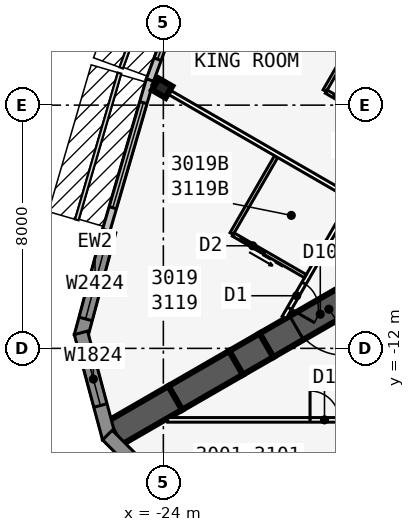
"""IFC4 building model, lengths in metres.
Left out: names, types, materials, properties, quantities, classifications, styles, units other than length and angle.
Written with IfcOpenShell. Run it as: python <this file> out.ifc"""

import sys

from ifc_helpers import new_model, si_unit, direction, frame, frame_2d, origin, origin_2d, place, context, subcontext, project, spatial, polyline, rectangle, i_section, outline, extrude, element, fill, save


model = new_model("IFC4")
c1 = context("Model", 3, precision=1e-05, world=origin(), true_north=direction((0.0, 1.0)))
c2 = subcontext(c1, "Body", "Model", "MODEL_VIEW")
j1 = project(units=[si_unit("LENGTHUNIT", "METRE"), si_unit("PLANEANGLEUNIT", "RADIAN")], contexts=[c1])
p1 = place(None, origin())
s1 = spatial("IfcSite", under=j1, at=p1, CompositionType="ELEMENT")
p2 = place(p1, origin())
s2 = spatial("IfcBuilding", under=s1, at=p2, CompositionType="ELEMENT")
p3 = place(p2, frame((0.0, 0.0, 118.1)))
s3 = spatial("IfcBuildingStorey", under=s2, at=p3, CompositionType="ELEMENT", Elevation=118.1)
p4 = place(p3, frame((-16.5, -9.526, 0.0), z_axis=(0.0, 0.0, 1.0), x_axis=(-0.866031398331, -0.499989616998, 0.0)))
e1 = element("IfcWall", 1, at=p4, inside=s3, PredefinedType="SHEAR", context=c2, shape_type="SweptSolid", body=[
    extrude(rectangle(XDim=4.746, YDim=0.9, at=frame_2d((2.373, 0.0))), origin(), (0.0, 0.0, 1.0), 3.4),
])
p5 = place(p4, frame((1.8, 0.0, 0.0)))
e2 = element("IfcOpeningElement", 2, at=p5, cuts=e1, PredefinedType="OPENING", context=c2, shape_type="SweptSolid", body=[
    extrude(rectangle(XDim=1.8, YDim=2.13, at=frame_2d((0.9, 1.065))), frame((0.0, 0.46, 0.0), z_axis=(0.0, -1.0, 0.0), x_axis=(1.0, 0.0, 0.0)), (0.0, 0.0, 1.0), 0.92),
])
p6 = place(p3, frame((-20.61, -11.899, 0.0), z_axis=(0.0, 0.0, 1.0), x_axis=(-0.866009537788, -0.500027479704, 0.0)))
e3 = element("IfcWall", 3, at=p6, inside=s3, PredefinedType="SHEAR", context=c2, shape_type="SweptSolid", body=[
    extrude(rectangle(XDim=1.155, YDim=0.9, at=frame_2d((0.577, 0.0))), origin(), (0.0, 0.0, 1.0), 3.4),
])
for number, where, z_axis, x_axis in (
    (4, (-21.61, -12.477, 0.0), (0.0, 0.0, 1.0), (-0.866, -0.5, 0.0)),
    (5, (-23.61, -13.631, 0.0), (0.0, 0.0, 1.0), (-0.866, -0.5, 0.0)),
):
    element("IfcWall", number, at=place(p3, frame(where, z_axis=z_axis, x_axis=x_axis)), inside=s3, PredefinedType="SHEAR", context=c2, shape_type="SweptSolid", body=[
        extrude(rectangle(XDim=2.309, YDim=0.9, at=frame_2d((1.155, 0.0))), origin(), (0.0, 0.0, 1.0), 3.4),
    ])
p7 = place(p3, frame((-24.041, -3.44, 0.0), z_axis=(0.0, 0.0, 1.0), x_axis=(-0.5, -0.866025403784, 0.0)))
e6 = element("IfcColumn", 6, at=p7, inside=s3, PredefinedType="COLUMN", context=c2, shape_type="SweptSolid", body=[
    extrude(i_section(OverallWidth=0.437, OverallDepth=0.513, WebThickness=0.061, FlangeThickness=0.097, at=origin_2d()), origin(), (0.0, 0.0, 1.0), 3.4),
])
p8 = place(p3, frame((-22.701, 1.584, 0.0), z_axis=(0.0, 0.0, 1.0), x_axis=(-0.343225593282, -0.939252996863, 0.0)))
e7 = element("IfcWall", 7, at=p8, inside=s3, PredefinedType="STANDARD", context=c2, shape_type="SweptSolid", body=[
    extrude(rectangle(XDim=5.076, YDim=0.25, at=frame_2d((2.538, 0.0))), origin(), (0.0, 0.0, 1.0), 3.235),
])
p9 = place(p8, frame((0.738, 0.0, 0.45)))
e8 = element("IfcOpeningElement", 8, at=p9, cuts=e7, PredefinedType="OPENING", context=c2, shape_type="SweptSolid", body=[
    extrude(rectangle(XDim=3.6, YDim=2.4, at=frame_2d((1.8, 1.2))), frame((0.0, 0.135, 0.0), z_axis=(0.0, -1.0, 0.0), x_axis=(1.0, 0.0, 0.0)), (0.0, 0.0, 1.0), 0.27),
])
p10 = place(p3, frame((-24.441, -3.175, 0.0), z_axis=(0.0, 0.0, 1.0), x_axis=(-0.279528287117, -0.960137457191, 0.0)))
e9 = element("IfcWall", 9, at=p10, inside=s3, PredefinedType="STANDARD", context=c2, shape_type="SweptSolid", body=[
    extrude(rectangle(XDim=5.148, YDim=0.25, at=frame_2d((2.574, 0.0))), origin(), (0.0, 0.0, 1.0), 3.235),
])
p11 = place(p10, frame((0.774, 0.0, 0.45)))
e10 = element("IfcOpeningElement", 10, at=p11, cuts=e9, PredefinedType="OPENING", context=c2, shape_type="SweptSolid", body=[
    extrude(rectangle(XDim=3.6, YDim=2.4, at=frame_2d((1.8, 1.2))), frame((0.0, 0.135, 0.0), z_axis=(0.0, -1.0, 0.0), x_axis=(1.0, 0.0, 0.0)), (0.0, 0.0, 1.0), 0.27),
])
p12 = place(p3, frame((-25.783, -8.141, 0.0), z_axis=(0.0, 0.0, 1.0), x_axis=(-0.258823421857, -0.965924653531, 0.0)))
e11 = element("IfcWall", 11, at=p12, inside=s3, PredefinedType="SOLIDWALL", context=c2, shape_type="SweptSolid", body=[
    extrude(rectangle(XDim=3.586, YDim=0.45, at=frame_2d((1.793, 0.0))), origin(), (0.0, 0.0, 1.0), 3.235),
])
p13 = place(p12, frame((0.593, 0.0, 0.45)))
e12 = element("IfcOpeningElement", 12, at=p13, cuts=e11, PredefinedType="OPENING", context=c2, shape_type="SweptSolid", body=[
    extrude(rectangle(XDim=2.4, YDim=2.4, at=frame_2d((1.2, 1.2))), frame((0.0, 0.235, 0.0), z_axis=(0.0, -1.0, 0.0), x_axis=(1.0, 0.0, 0.0)), (0.0, 0.0, 1.0), 0.47),
])
p14 = place(p3, frame((-26.711, -11.489, 0.0), z_axis=(0.0, 0.0, 1.0), x_axis=(0.258823421857, -0.965924653531, 0.0)))
e13 = element("IfcWall", 13, at=p14, inside=s3, PredefinedType="SOLIDWALL", context=c2, shape_type="SweptSolid", body=[
    extrude(outline(polyline([(3.586, 0.225), (3.527, 0.225), (3.035, 0.093), (3.0, 0.225), (0.0, 0.225), (0.0, -0.225), (3.586, -0.225), (3.586, 0.225)])), origin(), (0.0, 0.0, 1.0), 3.235),
])
p15 = place(p14, frame((0.675, 0.0, 0.45)))
e14 = element("IfcOpeningElement", 14, at=p15, cuts=e13, PredefinedType="OPENING", context=c2, shape_type="SweptSolid", body=[
    extrude(rectangle(XDim=1.8, YDim=2.4, at=frame_2d((0.9, 1.2))), frame((0.0, 0.235, 0.0), z_axis=(0.0, -1.0, 0.0), x_axis=(1.0, 0.0, 0.0)), (0.0, 0.0, 1.0), 0.47),
])
p16 = place(p3, frame((-25.841, -14.852, 0.0), z_axis=(0.0, 0.0, 1.0), x_axis=(0.707106781187, -0.707106781187, 0.0)))
e15 = element("IfcWall", 15, at=p16, inside=s3, PredefinedType="SOLIDWALL", context=c2, shape_type="SweptSolid", body=[
    extrude(outline(polyline([(3.586, 0.225), (0.586, 0.225), (0.551, 0.093), (0.059, 0.225), (0.0, 0.225), (0.0, -0.225), (3.586, -0.225), (3.586, 0.225)])), origin(), (0.0, 0.0, 1.0), 3.235),
])
p17 = place(p16, frame((1.111, 0.0, 0.45)))
e16 = element("IfcOpeningElement", 16, at=p17, cuts=e15, PredefinedType="OPENING", context=c2, shape_type="SweptSolid", body=[
    extrude(rectangle(XDim=1.8, YDim=2.4, at=frame_2d((0.9, 1.2))), frame((0.0, 0.235, 0.0), z_axis=(0.0, -1.0, 0.0), x_axis=(1.0, 0.0, 0.0)), (0.0, 0.0, 1.0), 0.47),
])
p18 = place(p3, frame((-23.857, -14.351, 0.0), z_axis=(0.0, 0.0, 1.0), x_axis=(1.0, 0.0, 0.0)))
e17 = element("IfcWall", 17, at=p18, inside=s3, PredefinedType="PARTITIONING", context=c2, shape_type="SweptSolid", body=[
    extrude(rectangle(XDim=47.714, YDim=0.15, at=frame_2d((23.857, 0.0))), origin(), (0.0, 0.0, 1.0), 3.235),
])
p19 = place(p18, frame((4.682, 0.0, 0.0)))
e18 = element("IfcOpeningElement", 18, at=p19, cuts=e17, PredefinedType="OPENING", context=c2, shape_type="SweptSolid", body=[
    extrude(rectangle(XDim=0.95, YDim=2.13, at=frame_2d((0.475, 1.065))), frame((0.0, 0.085, 0.0), z_axis=(0.0, -1.0, 0.0), x_axis=(1.0, 0.0, 0.0)), (0.0, 0.0, 1.0), 0.17),
])
p20 = place(p18, frame((11.482, 0.0, 0.0)))
e19 = element("IfcOpeningElement", 19, at=p20, cuts=e17, PredefinedType="OPENING", context=c2, shape_type="SweptSolid", body=[
    extrude(rectangle(XDim=0.95, YDim=2.13, at=frame_2d((0.475, 1.065))), frame((0.0, 0.085, 0.0), z_axis=(0.0, -1.0, 0.0), x_axis=(1.0, 0.0, 0.0)), (0.0, 0.0, 1.0), 0.17),
])
p21 = place(p18, frame((16.482, 0.0, 0.0)))
e20 = element("IfcOpeningElement", 20, at=p21, cuts=e17, PredefinedType="OPENING", context=c2, shape_type="SweptSolid", body=[
    extrude(rectangle(XDim=0.95, YDim=2.13, at=frame_2d((0.475, 1.065))), frame((0.0, 0.085, 0.0), z_axis=(0.0, -1.0, 0.0), x_axis=(1.0, 0.0, 0.0)), (0.0, 0.0, 1.0), 0.17),
])
p22 = place(p18, frame((21.482, 0.0, 0.0)))
e21 = element("IfcOpeningElement", 21, at=p22, cuts=e17, PredefinedType="OPENING", context=c2, shape_type="SweptSolid", body=[
    extrude(rectangle(XDim=0.95, YDim=2.13, at=frame_2d((0.475, 1.065))), frame((0.0, 0.085, 0.0), z_axis=(0.0, -1.0, 0.0), x_axis=(1.0, 0.0, 0.0)), (0.0, 0.0, 1.0), 0.17),
])
p23 = place(p18, frame((25.857, 0.0, 0.0)))
e22 = element("IfcOpeningElement", 22, at=p23, cuts=e17, PredefinedType="OPENING", context=c2, shape_type="SweptSolid", body=[
    extrude(rectangle(XDim=1.0, YDim=2.13, at=frame_2d((0.5, 1.065))), frame((0.0, 0.085, 0.0), z_axis=(0.0, -1.0, 0.0), x_axis=(1.0, 0.0, 0.0)), (0.0, 0.0, 1.0), 0.17),
])
p24 = place(p18, frame((32.082, 0.0, 0.0)))
e23 = element("IfcOpeningElement", 23, at=p24, cuts=e17, PredefinedType="OPENING", context=c2, shape_type="SweptSolid", body=[
    extrude(rectangle(XDim=0.95, YDim=2.13, at=frame_2d((0.475, 1.065))), frame((0.0, 0.085, 0.0), z_axis=(0.0, -1.0, 0.0), x_axis=(1.0, 0.0, 0.0)), (0.0, 0.0, 1.0), 0.17),
])
p25 = place(p18, frame((42.082, 0.0, 0.0)))
e24 = element("IfcOpeningElement", 24, at=p25, cuts=e17, PredefinedType="OPENING", context=c2, shape_type="SweptSolid", body=[
    extrude(rectangle(XDim=0.95, YDim=2.13, at=frame_2d((0.475, 1.065))), frame((0.0, 0.085, 0.0), z_axis=(0.0, -1.0, 0.0), x_axis=(1.0, 0.0, 0.0)), (0.0, 0.0, 1.0), 0.17),
])
p26 = place(p3, frame((-0.5, 22.836, 0.0), z_axis=(0.0, 0.0, 1.0), x_axis=(-0.500001677587, -0.866024435227, 0.0)))
e25 = element("IfcWall", 25, at=p26, inside=s3, PredefinedType="PARTITIONING", context=c2, shape_type="SweptSolid", body=[
    extrude(rectangle(XDim=39.054, YDim=0.15, at=frame_2d((19.527, 0.0))), origin(), (0.0, 0.0, 1.0), 3.235),
])
p27 = place(p26, frame((0.352, 0.0, 0.0)))
e26 = element("IfcOpeningElement", 26, at=p27, cuts=e25, PredefinedType="OPENING", context=c2, shape_type="SweptSolid", body=[
    extrude(rectangle(XDim=0.95, YDim=2.13, at=frame_2d((0.475, 1.065))), frame((0.0, 0.085, 0.0), z_axis=(0.0, -1.0, 0.0), x_axis=(1.0, 0.0, 0.0)), (0.0, 0.0, 1.0), 0.17),
])
p28 = place(p26, frame((7.152, 0.0, 0.0)))
e27 = element("IfcOpeningElement", 27, at=p28, cuts=e25, PredefinedType="OPENING", context=c2, shape_type="SweptSolid", body=[
    extrude(rectangle(XDim=0.95, YDim=2.13, at=frame_2d((0.475, 1.065))), frame((0.0, 0.085, 0.0), z_axis=(0.0, -1.0, 0.0), x_axis=(1.0, 0.0, 0.0)), (0.0, 0.0, 1.0), 0.17),
])
p29 = place(p26, frame((12.152, 0.0, 0.0)))
e28 = element("IfcOpeningElement", 28, at=p29, cuts=e25, PredefinedType="OPENING", context=c2, shape_type="SweptSolid", body=[
    extrude(rectangle(XDim=0.95, YDim=2.13, at=frame_2d((0.475, 1.065))), frame((0.0, 0.085, 0.0), z_axis=(0.0, -1.0, 0.0), x_axis=(1.0, 0.0, 0.0)), (0.0, 0.0, 1.0), 0.17),
])
p30 = place(p26, frame((17.152, 0.0, 0.0)))
e29 = element("IfcOpeningElement", 29, at=p30, cuts=e25, PredefinedType="OPENING", context=c2, shape_type="SweptSolid", body=[
    extrude(rectangle(XDim=0.95, YDim=2.13, at=frame_2d((0.475, 1.065))), frame((0.0, 0.085, 0.0), z_axis=(0.0, -1.0, 0.0), x_axis=(1.0, 0.0, 0.0)), (0.0, 0.0, 1.0), 0.17),
])
p31 = place(p26, frame((22.752, 0.0, 0.0)))
e30 = element("IfcOpeningElement", 30, at=p31, cuts=e25, PredefinedType="OPENING", context=c2, shape_type="SweptSolid", body=[
    extrude(rectangle(XDim=0.95, YDim=2.13, at=frame_2d((0.475, 1.065))), frame((0.0, 0.085, 0.0), z_axis=(0.0, -1.0, 0.0), x_axis=(1.0, 0.0, 0.0)), (0.0, 0.0, 1.0), 0.17),
])
p32 = place(p26, frame((32.152, 0.0, 0.0)))
e31 = element("IfcOpeningElement", 31, at=p32, cuts=e25, PredefinedType="OPENING", context=c2, shape_type="SweptSolid", body=[
    extrude(rectangle(XDim=0.95, YDim=2.13, at=frame_2d((0.475, 1.065))), frame((0.0, 0.085, 0.0), z_axis=(0.0, -1.0, 0.0), x_axis=(1.0, 0.0, 0.0)), (0.0, 0.0, 1.0), 0.17),
])
p33 = place(p26, frame((37.752, 0.0, 0.0)))
e32 = element("IfcOpeningElement", 32, at=p33, cuts=e25, PredefinedType="OPENING", context=c2, shape_type="SweptSolid", body=[
    extrude(rectangle(XDim=0.95, YDim=2.13, at=frame_2d((0.475, 1.065))), frame((0.0, 0.085, 0.0), z_axis=(0.0, -1.0, 0.0), x_axis=(1.0, 0.0, 0.0)), (0.0, 0.0, 1.0), 0.17),
])
p34 = place(p3, frame((-15.329, -2.697, 0.0), z_axis=(0.0, 0.0, 1.0), x_axis=(-0.866024316602, 0.50000188305, 0.0)))
e33 = element("IfcWall", 33, at=p34, inside=s3, PredefinedType="PARTITIONING", context=c2, shape_type="SweptSolid", body=[
    extrude(rectangle(XDim=8.395, YDim=0.15, at=frame_2d((4.198, 0.0))), origin(), (0.0, 0.0, 1.0), 2.389),
])
p35 = place(p3, frame((-17.829, -7.027, 0.0), z_axis=(0.0, 0.0, 1.0), x_axis=(-0.866029804378, 0.499992377871, 0.0)))
e34 = element("IfcWall", 34, at=p35, inside=s3, PredefinedType="PARTITIONING", context=c2, shape_type="SweptSolid", body=[
    extrude(rectangle(XDim=7.516, YDim=0.15, at=frame_2d((3.758, 0.0))), origin(), (0.0, 0.0, 1.0), 2.389),
])
p36 = place(p3, frame((-17.493, -1.447, 0.0), z_axis=(0.0, 0.0, 1.0), x_axis=(-0.500033551112, -0.866006032174, 0.0)))
e35 = element("IfcWall", 35, at=p36, inside=s3, PredefinedType="PLUMBINGWALL", context=c2, shape_type="SweptSolid", body=[
    extrude(rectangle(XDim=2.4, YDim=0.12, at=frame_2d((1.2, 0.0))), origin(), (0.0, 0.0, 1.0), 3.235),
])
p37 = place(p3, frame((-16.529, -4.776, 0.0), z_axis=(0.0, 0.0, 1.0), x_axis=(-0.866023955769, 0.500002508028, 0.0)))
e36 = element("IfcWall", 36, at=p37, inside=s3, PredefinedType="PLUMBINGWALL", context=c2, shape_type="SweptSolid", body=[
    extrude(rectangle(XDim=2.44, YDim=0.12, at=frame_2d((1.22, 0.0))), origin(), (0.0, 0.0, 1.0), 3.235),
])
p38 = place(p37, frame((1.25, 0.0, 0.0)))
e37 = element("IfcOpeningElement", 37, at=p38, cuts=e36, PredefinedType="OPENING", context=c2, shape_type="SweptSolid", body=[
    extrude(rectangle(XDim=0.9, YDim=2.13, at=frame_2d((0.45, 1.065))), frame((0.0, 0.07, 0.0), z_axis=(0.0, -1.0, 0.0), x_axis=(1.0, 0.0, 0.0)), (0.0, 0.0, 1.0), 0.14),
])
p39 = place(p3, frame((-20.253, -5.627, 0.0), z_axis=(0.0, 0.0, 1.0), x_axis=(-0.499990139034, -0.866031096941, 0.0)))
e38 = element("IfcWall", 38, at=p39, inside=s3, PredefinedType="PLUMBINGWALL", context=c2, shape_type="SweptSolid", body=[
    extrude(rectangle(XDim=3.0, YDim=0.12, at=frame_2d((1.5, 0.0))), origin(), (0.0, 0.0, 1.0), 3.235),
])
p40 = place(p3, frame((-19.329, -9.625, 0.0), z_axis=(0.0, 0.0, 1.0), x_axis=(-0.866035715982, 0.499982138324, 0.0)))
e39 = element("IfcWall", 39, at=p40, inside=s3, PredefinedType="PLUMBINGWALL", context=c2, shape_type="SweptSolid", body=[
    extrude(rectangle(XDim=2.74, YDim=0.12, at=frame_2d((1.37, 0.0))), origin(), (0.0, 0.0, 1.0), 3.235),
])
p41 = place(p40, frame((1.55, 0.0, 0.0)))
e40 = element("IfcOpeningElement", 40, at=p41, cuts=e39, PredefinedType="OPENING", context=c2, shape_type="SweptSolid", body=[
    extrude(rectangle(XDim=0.9, YDim=2.13, at=frame_2d((0.45, 1.065))), frame((0.0, 0.07, 0.0), z_axis=(0.0, -1.0, 0.0), x_axis=(1.0, 0.0, 0.0)), (0.0, 0.0, 1.0), 0.14),
])
p42 = place(p9, origin())
e41 = element("IfcWindow", 41, at=p42, inside=s3, PartitioningType="SINGLE_PANEL", PredefinedType="WINDOW", context=c2, shape_type="SweptSolid", body=[
    extrude(rectangle(XDim=3.6, YDim=2.4, at=frame_2d((1.8, 1.2))), frame((0.0, 0.03, 0.0), z_axis=(0.0, -1.0, 0.0), x_axis=(1.0, 0.0, 0.0)), (0.0, 0.0, 1.0), 0.06),
])
fill(e8, e41)
p43 = place(p11, origin())
e42 = element("IfcWindow", 42, at=p43, inside=s3, PartitioningType="SINGLE_PANEL", PredefinedType="WINDOW", context=c2, shape_type="SweptSolid", body=[
    extrude(rectangle(XDim=3.6, YDim=2.4, at=frame_2d((1.8, 1.2))), frame((0.0, 0.03, 0.0), z_axis=(0.0, -1.0, 0.0), x_axis=(1.0, 0.0, 0.0)), (0.0, 0.0, 1.0), 0.06),
])
fill(e10, e42)
p44 = place(p13, origin())
e43 = element("IfcWindow", 43, at=p44, inside=s3, PartitioningType="SINGLE_PANEL", PredefinedType="WINDOW", context=c2, shape_type="SweptSolid", body=[
    extrude(rectangle(XDim=2.4, YDim=2.4, at=frame_2d((1.2, 1.2))), frame((0.0, 0.03, 0.0), z_axis=(0.0, -1.0, 0.0), x_axis=(1.0, 0.0, 0.0)), (0.0, 0.0, 1.0), 0.06),
])
fill(e12, e43)
p45 = place(p15, origin())
e44 = element("IfcWindow", 44, at=p45, inside=s3, PartitioningType="SINGLE_PANEL", PredefinedType="WINDOW", context=c2, shape_type="SweptSolid", body=[
    extrude(rectangle(XDim=1.8, YDim=2.4, at=frame_2d((0.9, 1.2))), frame((0.0, 0.03, 0.0), z_axis=(0.0, -1.0, 0.0), x_axis=(1.0, 0.0, 0.0)), (0.0, 0.0, 1.0), 0.06),
])
fill(e14, e44)
p46 = place(p19, origin())
e45 = element("IfcDoor", 45, at=p46, inside=s3, OperationType="SINGLE_SWING_LEFT", PredefinedType="DOOR", context=c2, shape_type="SweptSolid", body=[
    extrude(rectangle(XDim=0.95, YDim=2.13, at=frame_2d((0.475, 1.065))), frame((0.0, 0.025, 0.0), z_axis=(0.0, -1.0, 0.0), x_axis=(1.0, 0.0, 0.0)), (0.0, 0.0, 1.0), 0.05),
])
fill(e18, e45)
p47 = place(p38, origin())
e46 = element("IfcDoor", 46, at=p47, inside=s3, OperationType="SLIDING_TO_LEFT", PredefinedType="DOOR", context=c2, shape_type="SweptSolid", body=[
    extrude(rectangle(XDim=0.9, YDim=2.13, at=frame_2d((0.45, 1.065))), frame((0.0, 0.025, 0.0), z_axis=(0.0, -1.0, 0.0), x_axis=(1.0, 0.0, 0.0)), (0.0, 0.0, 1.0), 0.05),
])
fill(e37, e46)
p48 = place(p41, origin())
e47 = element("IfcDoor", 47, at=p48, inside=s3, OperationType="SLIDING_TO_LEFT", PredefinedType="DOOR", context=c2, shape_type="SweptSolid", body=[
    extrude(rectangle(XDim=0.9, YDim=2.13, at=frame_2d((0.45, 1.065))), frame((0.0, 0.025, 0.0), z_axis=(0.0, -1.0, 0.0), x_axis=(1.0, 0.0, 0.0)), (0.0, 0.0, 1.0), 0.05),
])
fill(e40, e47)
p49 = place(p33, origin())
e48 = element("IfcDoor", 48, at=p49, inside=s3, OperationType="SINGLE_SWING_RIGHT", PredefinedType="DOOR", context=c2, shape_type="SweptSolid", body=[
    extrude(rectangle(XDim=0.95, YDim=2.13, at=frame_2d((0.475, 1.065))), frame((0.0, 0.025, 0.0), z_axis=(0.0, -1.0, 0.0), x_axis=(1.0, 0.0, 0.0)), (0.0, 0.0, 1.0), 0.05),
])
fill(e32, e48)
p50 = place(p5, origin())
e49 = element("IfcDoor", 49, at=p50, inside=s3, OperationType="DOUBLE_DOOR_DOUBLE_SWING", PredefinedType="DOOR", context=c2, shape_type="SweptSolid", body=[
    extrude(rectangle(XDim=1.8, YDim=2.13, at=frame_2d((0.9, 1.065))), frame((0.0, 0.025, 0.0), z_axis=(0.0, -1.0, 0.0), x_axis=(1.0, 0.0, 0.0)), (0.0, 0.0, 1.0), 0.05),
])
fill(e2, e49)
save(model, sys.argv[1])
